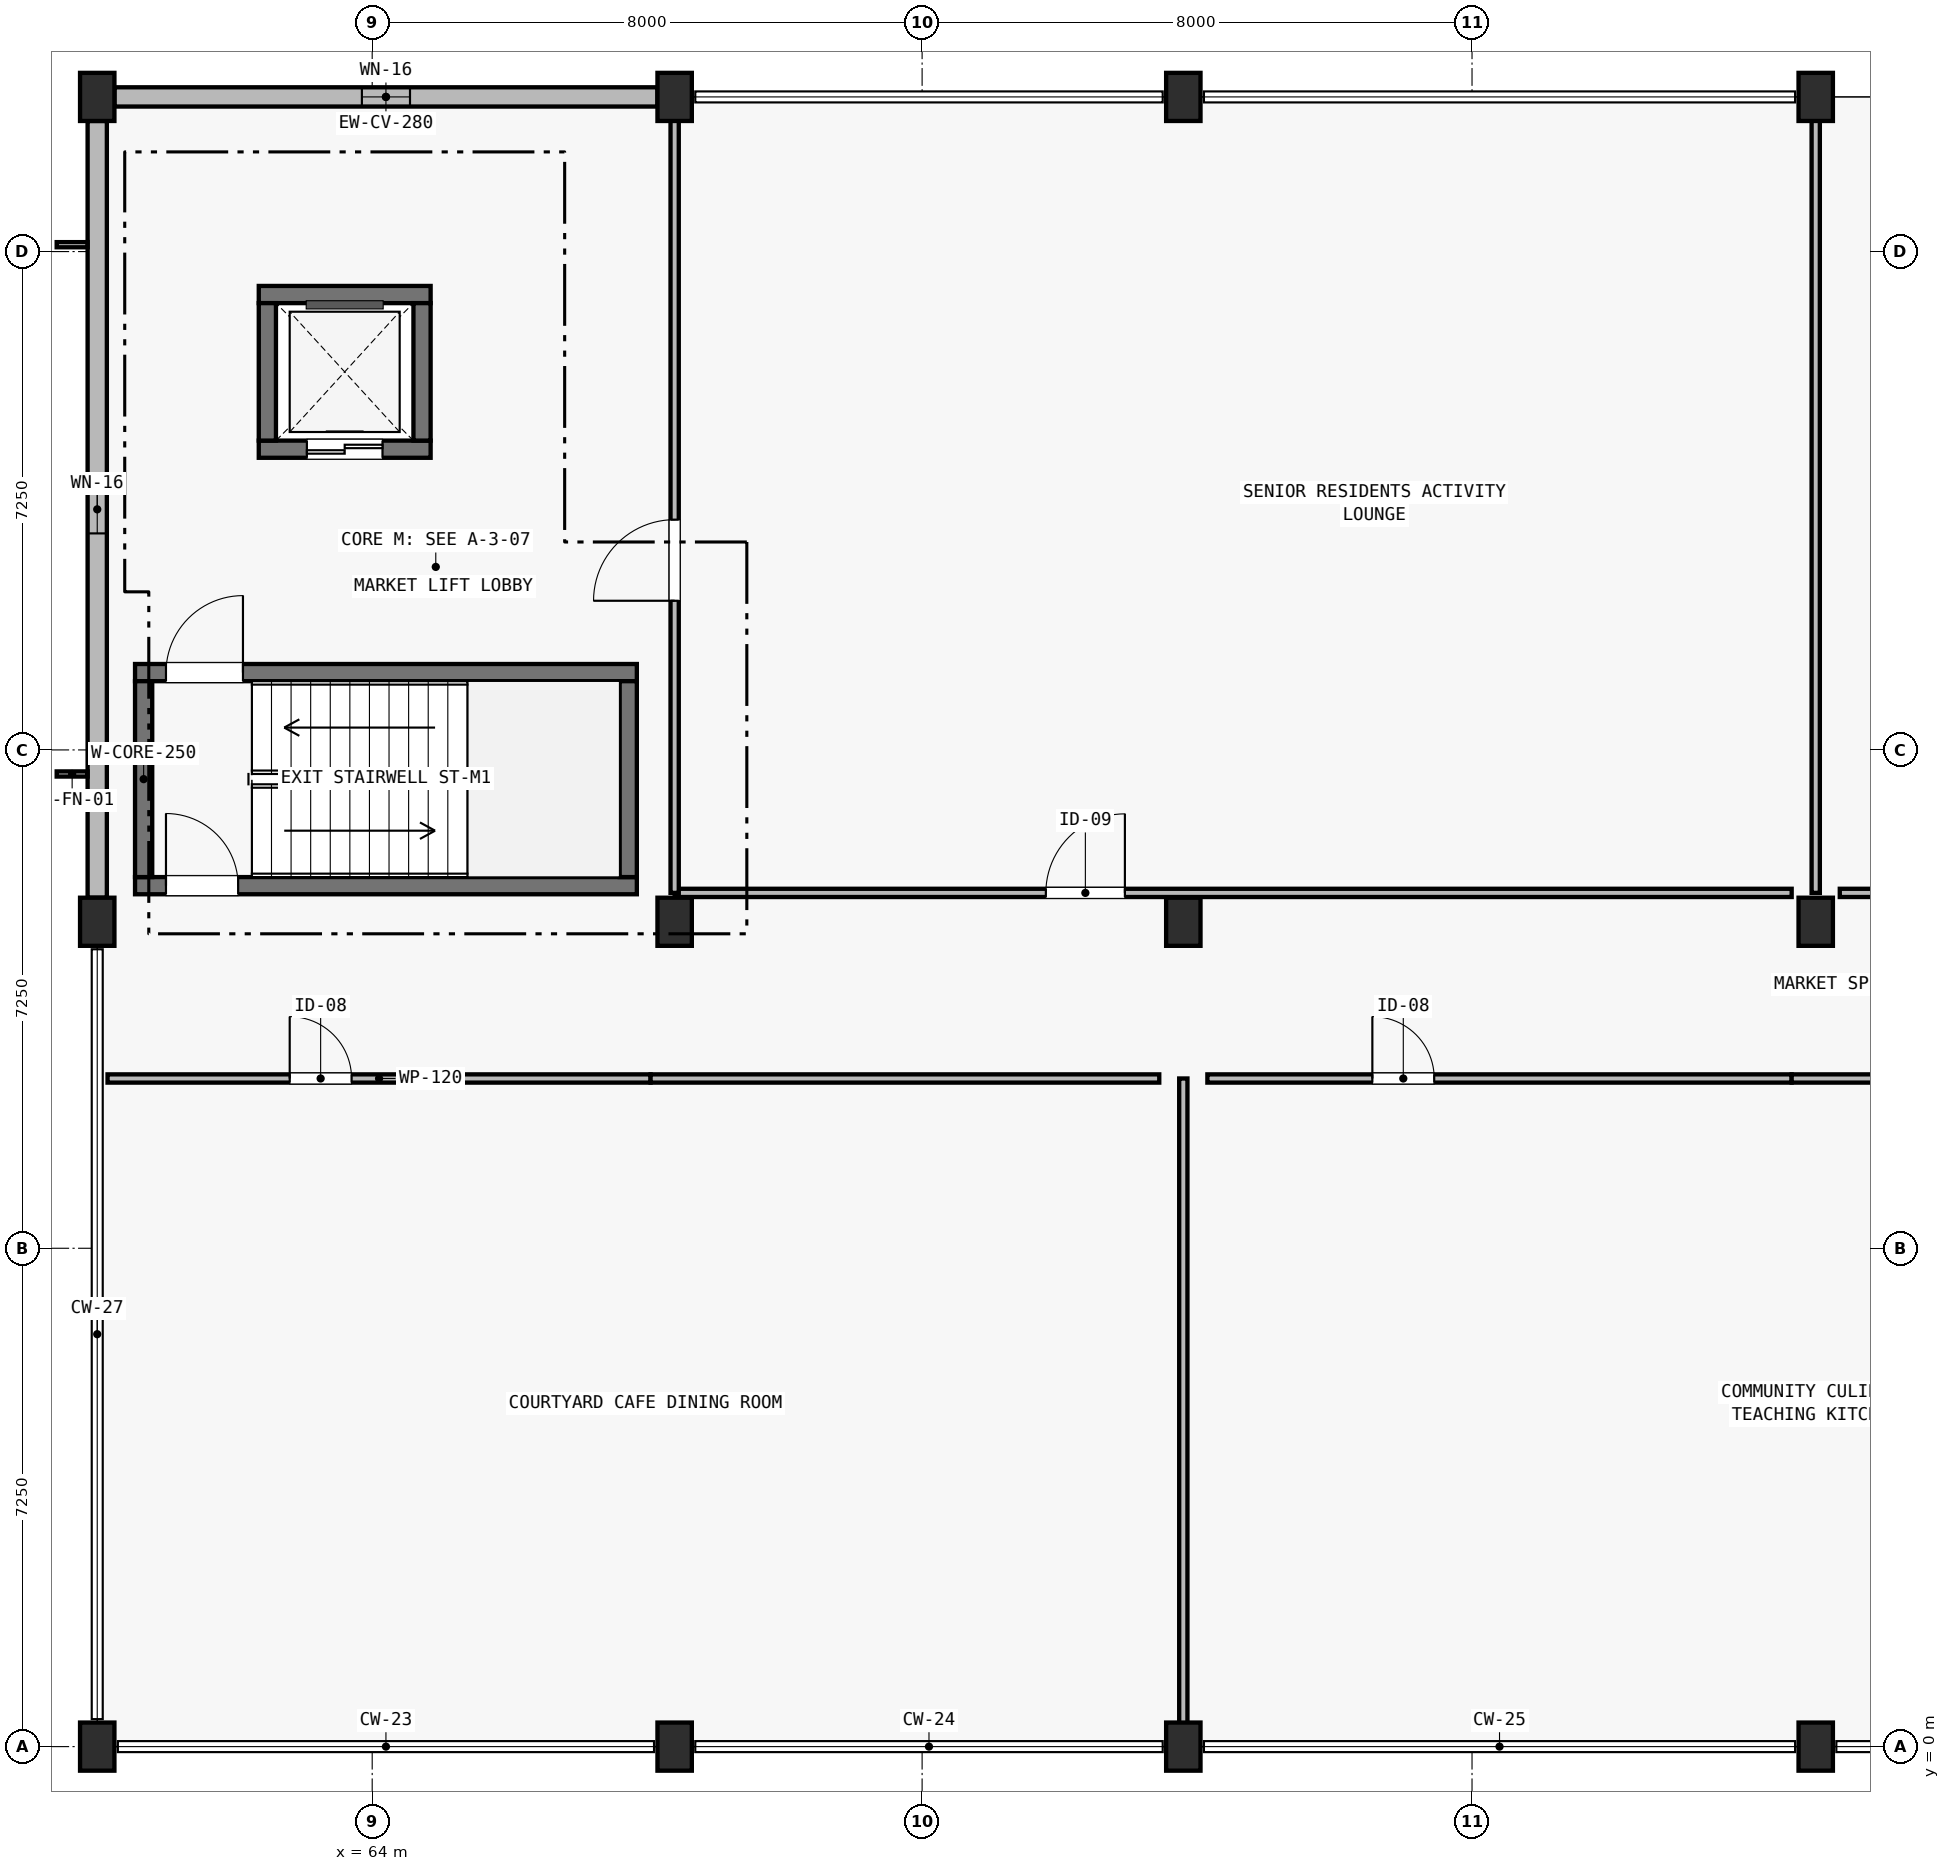
"""IFC4 building model, lengths in metres.
Left out: names, types, materials, properties, quantities, classifications, styles, units other than length and angle.
Written with IfcOpenShell. Run it as: python <this file> out.ifc"""

import sys

from ifc_helpers import new_model, si_unit, direction, frame, frame_2d, origin, origin_2d, place, context, subcontext, project, spatial, rectangle, extrude, element, fill, save


model = new_model("IFC4")
c1 = context("Model", 3, precision=1e-05, world=origin(), true_north=direction((0.0, 1.0)))
c2 = subcontext(c1, "Body", "Model", "MODEL_VIEW")
j1 = project(units=[si_unit("LENGTHUNIT", "METRE"), si_unit("PLANEANGLEUNIT", "RADIAN")], contexts=[c1])
p1 = place(None, origin())
s1 = spatial("IfcSite", under=j1, at=p1, CompositionType="ELEMENT")
p2 = place(p1, origin())
s2 = spatial("IfcBuilding", under=s1, at=p2, CompositionType="ELEMENT")
p3 = place(p2, frame((0.0, 0.0, 4.5)))
s3 = spatial("IfcBuildingStorey", under=s2, at=p3, CompositionType="ELEMENT", Elevation=4.5)
p4 = place(p3, frame((60.55, 12.525, 0.0), z_axis=(0.0, 0.0, 1.0), x_axis=(1.0, 0.0, 0.0)))
e1 = element("IfcWall", 1, at=p4, inside=s3, PredefinedType="SHEAR", context=c2, shape_type="SweptSolid", body=[
    extrude(rectangle(XDim=7.3, YDim=0.25, at=frame_2d((3.65, 0.0))), origin(), (0.0, 0.0, 1.0), 3.9),
])
p5 = place(p4, frame((0.45, 0.0, 0.0)))
e2 = element("IfcOpeningElement", 2, at=p5, cuts=e1, PredefinedType="OPENING", context=c2, shape_type="SweptSolid", body=[
    extrude(rectangle(XDim=1.05, YDim=2.15, at=frame_2d((0.525, 1.075))), frame((0.0, 0.14, 0.0), z_axis=(0.0, -1.0, 0.0), x_axis=(1.0, 0.0, 0.0)), (0.0, 0.0, 1.0), 0.28),
])
p6 = place(p3, frame((60.55, 15.625, 0.0), z_axis=(0.0, 0.0, 1.0), x_axis=(1.0, 0.0, 0.0)))
e3 = element("IfcWall", 3, at=p6, inside=s3, PredefinedType="SHEAR", context=c2, shape_type="SweptSolid", body=[
    extrude(rectangle(XDim=7.3, YDim=0.25, at=frame_2d((3.65, 0.0))), origin(), (0.0, 0.0, 1.0), 3.9),
])
p7 = place(p6, frame((0.45, 0.0, 0.0)))
e4 = element("IfcOpeningElement", 4, at=p7, cuts=e3, PredefinedType="OPENING", context=c2, shape_type="SweptSolid", body=[
    extrude(rectangle(XDim=1.12, YDim=2.15, at=frame_2d((0.56, 1.075))), frame((0.0, 0.14, 0.0), z_axis=(0.0, -1.0, 0.0), x_axis=(1.0, 0.0, 0.0)), (0.0, 0.0, 1.0), 0.28),
])
for number, where, z_axis, x_axis in (
    (5, (60.675, 12.65, 0.0), (0.0, 0.0, 1.0), (0.0, 1.0, 0.0)),
    (6, (67.725, 12.65, 0.0), (0.0, 0.0, 1.0), (0.0, 1.0, 0.0)),
):
    element("IfcWall", number, at=place(p3, frame(where, z_axis=z_axis, x_axis=x_axis)), inside=s3, PredefinedType="SHEAR", context=c2, shape_type="SweptSolid", body=[
        extrude(rectangle(XDim=2.85, YDim=0.25, at=frame_2d((1.425, 0.0))), origin(), (0.0, 0.0, 1.0), 3.9),
    ])
p8 = place(p3, frame((62.35, 21.125, 0.0), z_axis=(0.0, 0.0, 1.0), x_axis=(1.0, 0.0, 0.0)))
e7 = element("IfcWall", 7, at=p8, inside=s3, PredefinedType="SHEAR", context=c2, shape_type="SweptSolid", body=[
    extrude(rectangle(XDim=2.5, YDim=0.25, at=frame_2d((1.25, 0.0))), origin(), (0.0, 0.0, 1.0), 3.9),
])
p9 = place(p3, frame((62.35, 18.875, 0.0), z_axis=(0.0, 0.0, 1.0), x_axis=(1.0, 0.0, 0.0)))
e8 = element("IfcWall", 8, at=p9, inside=s3, PredefinedType="SHEAR", context=c2, shape_type="SweptSolid", body=[
    extrude(rectangle(XDim=2.5, YDim=0.25, at=frame_2d((1.25, 0.0))), origin(), (0.0, 0.0, 1.0), 3.9),
])
p10 = place(p9, frame((0.7, 0.0, 0.0)))
e9 = element("IfcOpeningElement", 9, at=p10, cuts=e8, PredefinedType="OPENING", context=c2, shape_type="SweptSolid", body=[
    extrude(rectangle(XDim=1.1, YDim=2.15, at=frame_2d((0.55, 1.075))), frame((0.0, 0.14, 0.0), z_axis=(0.0, -1.0, 0.0), x_axis=(1.0, 0.0, 0.0)), (0.0, 0.0, 1.0), 0.28),
])
for number, where, z_axis, x_axis in (
    (10, (62.475, 19.0, 0.0), (0.0, 0.0, 1.0), (0.0, 1.0, 0.0)),
    (11, (64.725, 19.0, 0.0), (0.0, 0.0, 1.0), (0.0, 1.0, 0.0)),
):
    element("IfcWall", number, at=place(p3, frame(where, z_axis=z_axis, x_axis=x_axis)), inside=s3, PredefinedType="SHEAR", context=c2, shape_type="SweptSolid", body=[
        extrude(rectangle(XDim=2.0, YDim=0.25, at=frame_2d((1.0, 0.0))), origin(), (0.0, 0.0, 1.0), 3.9),
    ])
for number, where, z_axis, x_axis in (
    (12, (60.0, 0.0, 0.0), (0.0, 0.0, 1.0), (1.0, 0.0, 0.0)),
    (13, (60.0, 12.0, 0.0), (0.0, 0.0, 1.0), (1.0, 0.0, 0.0)),
    (14, (60.0, 24.0, 0.0), (0.0, 0.0, 1.0), (1.0, 0.0, 0.0)),
    (15, (68.4, 0.0, 0.0), (0.0, 0.0, 1.0), (1.0, 0.0, 0.0)),
    (16, (68.4, 12.0, 0.0), (0.0, 0.0, 1.0), (1.0, 0.0, 0.0)),
    (17, (68.4, 24.0, 0.0), (0.0, 0.0, 1.0), (1.0, 0.0, 0.0)),
    (18, (75.8, 0.0, 0.0), (0.0, 0.0, 1.0), (1.0, 0.0, 0.0)),
    (19, (75.8, 12.0, 0.0), (0.0, 0.0, 1.0), (1.0, 0.0, 0.0)),
    (20, (75.8, 24.0, 0.0), (0.0, 0.0, 1.0), (1.0, 0.0, 0.0)),
    (21, (85.0, 0.0, 0.0), (0.0, 0.0, 1.0), (1.0, 0.0, 0.0)),
    (22, (85.0, 12.0, 0.0), (0.0, 0.0, 1.0), (1.0, 0.0, 0.0)),
    (23, (85.0, 24.0, 0.0), (0.0, 0.0, 1.0), (1.0, 0.0, 0.0)),
):
    element("IfcColumn", number, at=place(p3, frame(where, z_axis=z_axis, x_axis=x_axis)), inside=s3, PredefinedType="COLUMN", context=c2, shape_type="SweptSolid", body=[
        extrude(rectangle(XDim=0.5, YDim=0.7, at=origin_2d()), origin(), (0.0, 0.0, 1.0), 3.9),
    ])
p11 = place(p3, frame((60.25, 24.0, 0.0), z_axis=(0.0, 0.0, 1.0), x_axis=(1.0, 0.0, 0.0)))
e24 = element("IfcWall", 24, at=p11, inside=s3, PredefinedType="SOLIDWALL", context=c2, shape_type="SweptSolid", body=[
    extrude(rectangle(XDim=7.9, YDim=0.28, at=frame_2d((3.95, 0.0))), origin(), (0.0, 0.0, 1.0), 2.99),
])
p12 = place(p11, frame((3.6, 0.0, 0.42)))
e25 = element("IfcOpeningElement", 25, at=p12, cuts=e24, PredefinedType="OPENING", context=c2, shape_type="SweptSolid", body=[
    extrude(rectangle(XDim=0.7, YDim=2.14, at=frame_2d((0.35, 1.07))), frame((0.0, 0.155, 0.0), z_axis=(0.0, -1.0, 0.0), x_axis=(1.0, 0.0, 0.0)), (0.0, 0.0, 1.0), 0.31),
])
p13 = place(p3, frame((60.0, 12.35, 0.0), z_axis=(0.0, 0.0, 1.0), x_axis=(0.0, 1.0, 0.0)))
e26 = element("IfcWall", 26, at=p13, inside=s3, PredefinedType="SOLIDWALL", context=c2, shape_type="SweptSolid", body=[
    extrude(rectangle(XDim=11.3, YDim=0.28, at=frame_2d((5.65, 0.0))), origin(), (0.0, 0.0, 1.0), 2.99),
])
p14 = place(p13, frame((5.3, 0.0, 0.42)))
e27 = element("IfcOpeningElement", 27, at=p14, cuts=e26, PredefinedType="OPENING", context=c2, shape_type="SweptSolid", body=[
    extrude(rectangle(XDim=0.7, YDim=2.14, at=frame_2d((0.35, 1.07))), frame((0.0, 0.155, 0.0), z_axis=(0.0, -1.0, 0.0), x_axis=(1.0, 0.0, 0.0)), (0.0, 0.0, 1.0), 0.31),
])
p15 = place(p3, frame((60.15, 9.72, 0.0), z_axis=(0.0, 0.0, 1.0), x_axis=(1.0, 0.0, 0.0)))
e28 = element("IfcWall", 28, at=p15, inside=s3, PredefinedType="PARTITIONING", context=c2, shape_type="SweptSolid", body=[
    extrude(rectangle(XDim=7.9, YDim=0.12, at=frame_2d((3.95, 0.0))), origin(), (0.0, 0.0, 1.0), 3.63),
])
p16 = place(p15, frame((2.65, 0.0, 0.0)))
e29 = element("IfcOpeningElement", 29, at=p16, cuts=e28, PredefinedType="OPENING", context=c2, shape_type="SweptSolid", body=[
    extrude(rectangle(XDim=0.9, YDim=2.1, at=frame_2d((0.45, 1.05))), frame((0.0, 0.075, 0.0), z_axis=(0.0, -1.0, 0.0), x_axis=(1.0, 0.0, 0.0)), (0.0, 0.0, 1.0), 0.15),
])
p17 = place(p3, frame((68.05, 9.72, 0.0), z_axis=(0.0, 0.0, 1.0), x_axis=(1.0, 0.0, 0.0)))
e30 = element("IfcWall", 30, at=p17, inside=s3, PredefinedType="PARTITIONING", context=c2, shape_type="SweptSolid", body=[
    extrude(rectangle(XDim=7.4, YDim=0.12, at=frame_2d((3.7, 0.0))), origin(), (0.0, 0.0, 1.0), 3.63),
])
p18 = place(p3, frame((76.15, 9.72, 0.0), z_axis=(0.0, 0.0, 1.0), x_axis=(1.0, 0.0, 0.0)))
e31 = element("IfcWall", 31, at=p18, inside=s3, PredefinedType="PARTITIONING", context=c2, shape_type="SweptSolid", body=[
    extrude(rectangle(XDim=8.5, YDim=0.12, at=frame_2d((4.25, 0.0))), origin(), (0.0, 0.0, 1.0), 3.63),
])
p19 = place(p18, frame((2.4, 0.0, 0.0)))
e32 = element("IfcOpeningElement", 32, at=p19, cuts=e31, PredefinedType="OPENING", context=c2, shape_type="SweptSolid", body=[
    extrude(rectangle(XDim=0.9, YDim=2.1, at=frame_2d((0.45, 1.05))), frame((0.0, 0.075, 0.0), z_axis=(0.0, -1.0, 0.0), x_axis=(1.0, 0.0, 0.0)), (0.0, 0.0, 1.0), 0.15),
])
p20 = place(p3, frame((84.65, 9.72, 0.0), z_axis=(0.0, 0.0, 1.0), x_axis=(1.0, 0.0, 0.0)))
e33 = element("IfcWall", 33, at=p20, inside=s3, PredefinedType="PARTITIONING", context=c2, shape_type="SweptSolid", body=[
    extrude(rectangle(XDim=9.2, YDim=0.12, at=frame_2d((4.6, 0.0))), origin(), (0.0, 0.0, 1.0), 3.63),
])
p21 = place(p3, frame((75.8, 0.12, 0.0), z_axis=(0.0, 0.0, 1.0), x_axis=(0.0, 1.0, 0.0)))
e34 = element("IfcWall", 34, at=p21, inside=s3, PredefinedType="PARTITIONING", context=c2, shape_type="SweptSolid", body=[
    extrude(rectangle(XDim=9.6, YDim=0.12, at=frame_2d((4.8, 0.0))), origin(), (0.0, 0.0, 1.0), 3.0),
])
p22 = place(p3, frame((68.4, 12.42, 0.0), z_axis=(0.0, 0.0, 1.0), x_axis=(1.0, 0.0, 0.0)))
e35 = element("IfcWall", 35, at=p22, inside=s3, PredefinedType="PARTITIONING", context=c2, shape_type="SweptSolid", body=[
    extrude(rectangle(XDim=16.25, YDim=0.12, at=frame_2d((8.125, 0.0))), origin(), (0.0, 0.0, 1.0), 3.63),
])
p23 = place(p22, frame((5.4, 0.0, 0.0)))
e36 = element("IfcOpeningElement", 36, at=p23, cuts=e35, PredefinedType="OPENING", context=c2, shape_type="SweptSolid", body=[
    extrude(rectangle(XDim=1.15, YDim=2.15, at=frame_2d((0.575, 1.075))), frame((0.0, 0.075, 0.0), z_axis=(0.0, -1.0, 0.0), x_axis=(1.0, 0.0, 0.0)), (0.0, 0.0, 1.0), 0.15),
])
p24 = place(p3, frame((85.35, 12.42, 0.0), z_axis=(0.0, 0.0, 1.0), x_axis=(1.0, 0.0, 0.0)))
e37 = element("IfcWall", 37, at=p24, inside=s3, PredefinedType="PARTITIONING", context=c2, shape_type="SweptSolid", body=[
    extrude(rectangle(XDim=8.85, YDim=0.12, at=frame_2d((4.425, 0.0))), origin(), (0.0, 0.0, 1.0), 3.63),
])
p25 = place(p24, frame((3.25, 0.0, 0.0)))
e38 = element("IfcOpeningElement", 38, at=p25, cuts=e37, PredefinedType="OPENING", context=c2, shape_type="SweptSolid", body=[
    extrude(rectangle(XDim=0.9, YDim=2.1, at=frame_2d((0.45, 1.05))), frame((0.0, 0.075, 0.0), z_axis=(0.0, -1.0, 0.0), x_axis=(1.0, 0.0, 0.0)), (0.0, 0.0, 1.0), 0.15),
])
p26 = place(p3, frame((68.4, 12.42, 0.0), z_axis=(0.0, 0.0, 1.0), x_axis=(0.0, 1.0, 0.0)))
e39 = element("IfcWall", 39, at=p26, inside=s3, PredefinedType="PARTITIONING", context=c2, shape_type="SweptSolid", body=[
    extrude(rectangle(XDim=11.54, YDim=0.12, at=frame_2d((5.77, 0.0))), origin(), (0.0, 0.0, 1.0), 3.0),
])
p27 = place(p26, frame((4.25, 0.0, 0.0)))
e40 = element("IfcOpeningElement", 40, at=p27, cuts=e39, PredefinedType="OPENING", context=c2, shape_type="SweptSolid", body=[
    extrude(rectangle(XDim=1.18, YDim=2.15, at=frame_2d((0.59, 1.075))), frame((0.0, 0.075, 0.0), z_axis=(0.0, -1.0, 0.0), x_axis=(1.0, 0.0, 0.0)), (0.0, 0.0, 1.0), 0.15),
])
p28 = place(p3, frame((85.0, 12.42, 0.0), z_axis=(0.0, 0.0, 1.0), x_axis=(0.0, 1.0, 0.0)))
e41 = element("IfcWall", 41, at=p28, inside=s3, PredefinedType="PARTITIONING", context=c2, shape_type="SweptSolid", body=[
    extrude(rectangle(XDim=11.54, YDim=0.12, at=frame_2d((5.77, 0.0))), origin(), (0.0, 0.0, 1.0), 3.0),
])
p29 = place(p12, origin())
e42 = element("IfcWindow", 42, at=p29, inside=s3, PartitioningType="SINGLE_PANEL", PredefinedType="WINDOW", context=c2, shape_type="SweptSolid", body=[
    extrude(rectangle(XDim=0.7, YDim=2.14, at=frame_2d((0.35, 1.07))), frame((0.0, 0.03, 0.0), z_axis=(0.0, -1.0, 0.0), x_axis=(1.0, 0.0, 0.0)), (0.0, 0.0, 1.0), 0.06),
])
fill(e25, e42)
p30 = place(p14, origin())
e43 = element("IfcWindow", 43, at=p30, inside=s3, PartitioningType="SINGLE_PANEL", PredefinedType="WINDOW", context=c2, shape_type="SweptSolid", body=[
    extrude(rectangle(XDim=0.7, YDim=2.14, at=frame_2d((0.35, 1.07))), frame((0.0, 0.03, 0.0), z_axis=(0.0, -1.0, 0.0), x_axis=(1.0, 0.0, 0.0)), (0.0, 0.0, 1.0), 0.06),
])
fill(e27, e43)
p31 = place(p16, origin())
e44 = element("IfcDoor", 44, at=p31, inside=s3, OperationType="SINGLE_SWING_LEFT", PredefinedType="DOOR", context=c2, shape_type="SweptSolid", body=[
    extrude(rectangle(XDim=0.9, YDim=2.1, at=frame_2d((0.45, 1.05))), frame((0.0, 0.025, 0.0), z_axis=(0.0, -1.0, 0.0), x_axis=(1.0, 0.0, 0.0)), (0.0, 0.0, 1.0), 0.05),
])
fill(e29, e44)
p32 = place(p19, origin())
e45 = element("IfcDoor", 45, at=p32, inside=s3, OperationType="SINGLE_SWING_LEFT", PredefinedType="DOOR", context=c2, shape_type="SweptSolid", body=[
    extrude(rectangle(XDim=0.9, YDim=2.1, at=frame_2d((0.45, 1.05))), frame((0.0, 0.025, 0.0), z_axis=(0.0, -1.0, 0.0), x_axis=(1.0, 0.0, 0.0)), (0.0, 0.0, 1.0), 0.05),
])
fill(e32, e45)
p33 = place(p23, origin())
e46 = element("IfcDoor", 46, at=p33, inside=s3, OperationType="SINGLE_SWING_RIGHT", PredefinedType="DOOR", context=c2, shape_type="SweptSolid", body=[
    extrude(rectangle(XDim=1.15, YDim=2.15, at=frame_2d((0.575, 1.075))), frame((0.0, 0.025, 0.0), z_axis=(0.0, -1.0, 0.0), x_axis=(1.0, 0.0, 0.0)), (0.0, 0.0, 1.0), 0.05),
])
fill(e36, e46)
p34 = place(p27, origin())
e47 = element("IfcDoor", 47, at=p34, inside=s3, OperationType="SINGLE_SWING_LEFT", PredefinedType="DOOR", context=c2, shape_type="SweptSolid", body=[
    extrude(rectangle(XDim=1.18, YDim=2.15, at=frame_2d((0.59, 1.075))), frame((0.0, 0.025, 0.0), z_axis=(0.0, -1.0, 0.0), x_axis=(1.0, 0.0, 0.0)), (0.0, 0.0, 1.0), 0.05),
])
fill(e40, e47)
p35 = place(p5, origin())
e48 = element("IfcDoor", 48, at=p35, inside=s3, OperationType="SINGLE_SWING_LEFT", PredefinedType="DOOR", context=c2, shape_type="SweptSolid", body=[
    extrude(rectangle(XDim=1.05, YDim=2.15, at=frame_2d((0.525, 1.075))), frame((0.0, 0.025, 0.0), z_axis=(0.0, -1.0, 0.0), x_axis=(1.0, 0.0, 0.0)), (0.0, 0.0, 1.0), 0.05),
])
fill(e2, e48)
p36 = place(p7, origin())
e49 = element("IfcDoor", 49, at=p36, inside=s3, OperationType="SINGLE_SWING_RIGHT", PredefinedType="DOOR", context=c2, shape_type="SweptSolid", body=[
    extrude(rectangle(XDim=1.12, YDim=2.15, at=frame_2d((0.56, 1.075))), frame((0.0, 0.025, 0.0), z_axis=(0.0, -1.0, 0.0), x_axis=(1.0, 0.0, 0.0)), (0.0, 0.0, 1.0), 0.05),
])
fill(e4, e49)
p37 = place(p10, origin())
e50 = element("IfcDoor", 50, at=p37, inside=s3, OperationType="DOUBLE_DOOR_SLIDING", PredefinedType="DOOR", context=c2, shape_type="SweptSolid", body=[
    extrude(rectangle(XDim=1.1, YDim=2.15, at=frame_2d((0.55, 1.075))), frame((0.0, 0.025, 0.0), z_axis=(0.0, -1.0, 0.0), x_axis=(1.0, 0.0, 0.0)), (0.0, 0.0, 1.0), 0.05),
])
fill(e9, e50)
save(model, sys.argv[1])
